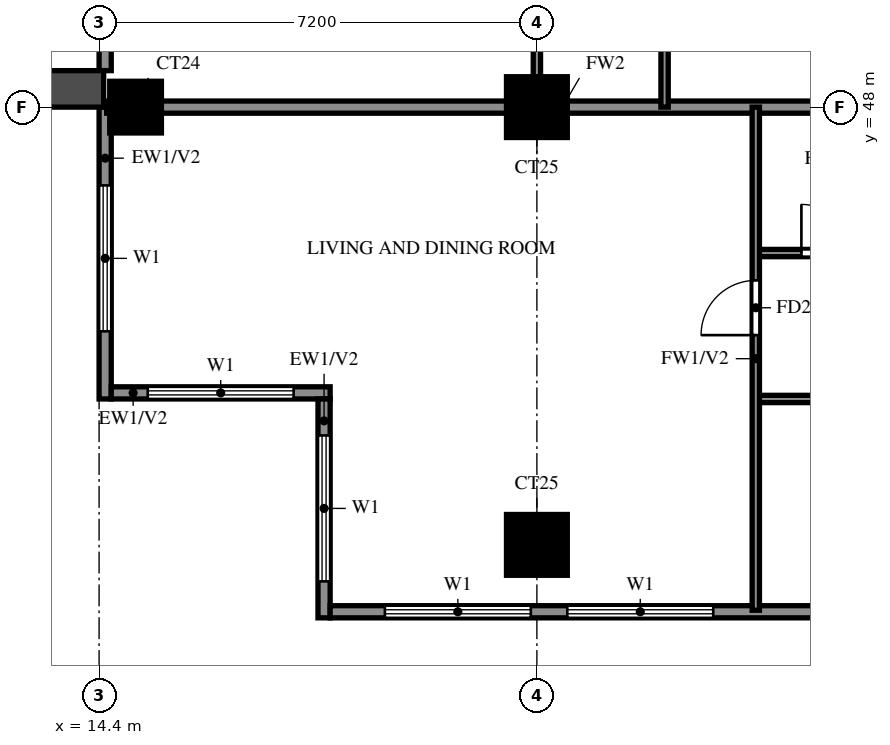
"""IFC4 building model, lengths in metres.
Left out: names, types, materials, properties, quantities, classifications, styles, units other than length and angle.
Written with IfcOpenShell. Run it as: python <this file> out.ifc"""

import sys

from ifc_helpers import new_model, si_unit, direction, frame, frame_2d, origin, origin_2d, place, context, subcontext, project, spatial, rectangle, extrude, source, transform, mapped, element, fill, save


model = new_model("IFC4")
c1 = context("Model", 3, precision=1e-05, world=origin(), true_north=direction((0.0, 1.0)))
c2 = subcontext(c1, "Body", "Model", "MODEL_VIEW")
j1 = project(units=[si_unit("LENGTHUNIT", "METRE"), si_unit("PLANEANGLEUNIT", "RADIAN")], contexts=[c1])
p1 = place(None, origin())
s1 = spatial("IfcSite", under=j1, at=p1, CompositionType="ELEMENT")
p2 = place(p1, origin())
s2 = spatial("IfcBuilding", under=s1, at=p2, CompositionType="ELEMENT")
p3 = place(p2, frame((0.0, 0.0, 153.5)))
s3 = spatial("IfcBuildingStorey", under=s2, at=p3, CompositionType="ELEMENT", Elevation=153.5)
m1 = source(origin(), c2, "Body", "SweptSolid", [
    extrude(rectangle(XDim=1.0, YDim=1.0, at=origin_2d()), origin(), (0.0, 0.0, 1.0), 3.2),
])
p4 = place(p3, frame((21.6, 40.8, 0.0), z_axis=(0.0, 0.0, 1.0), x_axis=(1.0, 0.0, 0.0)))
e1 = element("IfcColumn", 1, at=p4, inside=s3, PredefinedType="COLUMN", context=c2, shape_type="MappedRepresentation", body=[
    mapped(m1, transform((0.0, 0.0, 0.0))),
])
m2 = source(origin(), c2, "Body", "SweptSolid", [
    extrude(rectangle(XDim=0.85, YDim=0.85, at=origin_2d()), origin(), (0.0, 0.0, 1.0), 3.2),
])
p5 = place(p3, frame((15.0, 48.0, 0.0), z_axis=(0.0, 0.0, 1.0), x_axis=(1.0, 0.0, 0.0)))
e2 = element("IfcColumn", 2, at=p5, inside=s3, PredefinedType="COLUMN", context=c2, shape_type="MappedRepresentation", body=[
    mapped(m2, transform((0.0, 0.0, 0.0))),
])
p6 = place(p3, frame((21.6, 48.0, 0.0), z_axis=(0.0, 0.0, 1.0), x_axis=(1.0, 0.0, 0.0)))
e3 = element("IfcColumn", 3, at=p6, inside=s3, PredefinedType="COLUMN", context=c2, shape_type="MappedRepresentation", body=[
    mapped(m1, transform((0.0, 0.0, 0.0))),
])
p7 = place(p3, frame((14.5, 54.6, 0.0), z_axis=(0.0, 0.0, 1.0), x_axis=(0.0, -1.0, 0.0)))
e4 = element("IfcWall", 4, at=p7, inside=s3, PredefinedType="SOLIDWALL", context=c2, shape_type="SweptSolid", body=[
    extrude(rectangle(XDim=6.0, YDim=0.2, at=frame_2d((3.0, 0.0))), origin(), (0.0, 0.0, 1.0), 3.2),
])
p8 = place(p7, frame((2.1, 0.0, 0.0)))
e5 = element("IfcOpeningElement", 5, at=p8, cuts=e4, PredefinedType="OPENING", context=c2, shape_type="SweptSolid", body=[
    extrude(rectangle(XDim=1.8, YDim=2.4, at=frame_2d((0.9, 1.2))), frame((0.0, 0.11, 0.0), z_axis=(0.0, -1.0, 0.0), x_axis=(1.0, 0.0, 0.0)), (0.0, 0.0, 1.0), 0.22),
])
p9 = place(p7, frame((0.4, 0.0, 0.6)))
e6 = element("IfcOpeningElement", 6, at=p9, cuts=e4, PredefinedType="OPENING", context=c2, shape_type="SweptSolid", body=[
    extrude(rectangle(XDim=1.2, YDim=2.4, at=frame_2d((0.6, 1.2))), frame((0.0, 0.11, 0.0), z_axis=(0.0, -1.0, 0.0), x_axis=(1.0, 0.0, 0.0)), (0.0, 0.0, 1.0), 0.22),
])
p10 = place(p7, frame((4.4, 0.0, 0.6)))
e7 = element("IfcOpeningElement", 7, at=p10, cuts=e4, PredefinedType="OPENING", context=c2, shape_type="SweptSolid", body=[
    extrude(rectangle(XDim=1.2, YDim=2.4, at=frame_2d((0.6, 1.2))), frame((0.0, 0.11, 0.0), z_axis=(0.0, -1.0, 0.0), x_axis=(1.0, 0.0, 0.0)), (0.0, 0.0, 1.0), 0.22),
])
p11 = place(p3, frame((14.5, 48.0, 0.0), z_axis=(0.0, 0.0, 1.0), x_axis=(0.0, -1.0, 0.0)))
e8 = element("IfcWall", 8, at=p11, inside=s3, PredefinedType="SOLIDWALL", context=c2, shape_type="SweptSolid", body=[
    extrude(rectangle(XDim=4.8, YDim=0.2, at=frame_2d((2.4, 0.0))), origin(), (0.0, 0.0, 1.0), 3.2),
])
p12 = place(p11, frame((1.288, 0.0, 0.6)))
e9 = element("IfcOpeningElement", 9, at=p12, cuts=e8, PredefinedType="OPENING", context=c2, shape_type="SweptSolid", body=[
    extrude(rectangle(XDim=2.4, YDim=2.4, at=frame_2d((1.2, 1.2))), frame((0.0, 0.11, 0.0), z_axis=(0.0, -1.0, 0.0), x_axis=(1.0, 0.0, 0.0)), (0.0, 0.0, 1.0), 0.22),
])
p13 = place(p3, frame((14.6, 43.3, 0.0), z_axis=(0.0, 0.0, 1.0), x_axis=(1.0, 0.0, 0.0)))
e10 = element("IfcWall", 10, at=p13, inside=s3, PredefinedType="SOLIDWALL", context=c2, shape_type="SweptSolid", body=[
    extrude(rectangle(XDim=3.6, YDim=0.2, at=frame_2d((1.8, 0.0))), origin(), (0.0, 0.0, 1.0), 3.2),
])
p14 = place(p13, frame((0.6, 0.0, 0.6)))
e11 = element("IfcOpeningElement", 11, at=p14, cuts=e10, PredefinedType="OPENING", context=c2, shape_type="SweptSolid", body=[
    extrude(rectangle(XDim=2.4, YDim=2.4, at=frame_2d((1.2, 1.2))), frame((0.0, 0.11, 0.0), z_axis=(0.0, -1.0, 0.0), x_axis=(1.0, 0.0, 0.0)), (0.0, 0.0, 1.0), 0.22),
])
p15 = place(p3, frame((18.1, 43.2, 0.0), z_axis=(0.0, 0.0, 1.0), x_axis=(0.0, -1.0, 0.0)))
e12 = element("IfcWall", 12, at=p15, inside=s3, PredefinedType="SOLIDWALL", context=c2, shape_type="SweptSolid", body=[
    extrude(rectangle(XDim=3.6, YDim=0.2, at=frame_2d((1.8, 0.0))), origin(), (0.0, 0.0, 1.0), 3.2),
])
p16 = place(p15, frame((0.6, 0.0, 0.6)))
e13 = element("IfcOpeningElement", 13, at=p16, cuts=e12, PredefinedType="OPENING", context=c2, shape_type="SweptSolid", body=[
    extrude(rectangle(XDim=2.4, YDim=2.4, at=frame_2d((1.2, 1.2))), frame((0.0, 0.11, 0.0), z_axis=(0.0, -1.0, 0.0), x_axis=(1.0, 0.0, 0.0)), (0.0, 0.0, 1.0), 0.22),
])
p17 = place(p3, frame((18.2, 39.7, 0.0), z_axis=(0.0, 0.0, 1.0), x_axis=(1.0, 0.0, 0.0)))
e14 = element("IfcWall", 14, at=p17, inside=s3, PredefinedType="SOLIDWALL", context=c2, shape_type="SweptSolid", body=[
    extrude(rectangle(XDim=23.8, YDim=0.2, at=frame_2d((11.9, 0.0))), origin(), (0.0, 0.0, 1.0), 3.2),
])
p18 = place(p17, frame((13.3, 0.0, 0.0)))
e15 = element("IfcOpeningElement", 15, at=p18, cuts=e14, PredefinedType="OPENING", context=c2, shape_type="SweptSolid", body=[
    extrude(rectangle(XDim=1.8, YDim=2.4, at=frame_2d((0.9, 1.2))), frame((0.0, 0.11, 0.0), z_axis=(0.0, -1.0, 0.0), x_axis=(1.0, 0.0, 0.0)), (0.0, 0.0, 1.0), 0.22),
])
p19 = place(p17, frame((0.9, 0.0, 0.6)))
e16 = element("IfcOpeningElement", 16, at=p19, cuts=e14, PredefinedType="OPENING", context=c2, shape_type="SweptSolid", body=[
    extrude(rectangle(XDim=2.4, YDim=2.4, at=frame_2d((1.2, 1.2))), frame((0.0, 0.11, 0.0), z_axis=(0.0, -1.0, 0.0), x_axis=(1.0, 0.0, 0.0)), (0.0, 0.0, 1.0), 0.22),
])
p20 = place(p17, frame((3.9, 0.0, 0.6)))
e17 = element("IfcOpeningElement", 17, at=p20, cuts=e14, PredefinedType="OPENING", context=c2, shape_type="SweptSolid", body=[
    extrude(rectangle(XDim=2.4, YDim=2.4, at=frame_2d((1.2, 1.2))), frame((0.0, 0.11, 0.0), z_axis=(0.0, -1.0, 0.0), x_axis=(1.0, 0.0, 0.0)), (0.0, 0.0, 1.0), 0.22),
])
p21 = place(p17, frame((10.9, 0.0, 0.6)))
e18 = element("IfcOpeningElement", 18, at=p21, cuts=e14, PredefinedType="OPENING", context=c2, shape_type="SweptSolid", body=[
    extrude(rectangle(XDim=1.8, YDim=2.4, at=frame_2d((0.9, 1.2))), frame((0.0, 0.11, 0.0), z_axis=(0.0, -1.0, 0.0), x_axis=(1.0, 0.0, 0.0)), (0.0, 0.0, 1.0), 0.22),
])
p22 = place(p17, frame((8.35, 0.0, 1.5)))
e19 = element("IfcOpeningElement", 19, at=p22, cuts=e14, PredefinedType="OPENING", context=c2, shape_type="SweptSolid", body=[
    extrude(rectangle(XDim=0.9, YDim=0.9, at=frame_2d((0.45, 0.45))), frame((0.0, 0.11, 0.0), z_axis=(0.0, -1.0, 0.0), x_axis=(1.0, 0.0, 0.0)), (0.0, 0.0, 1.0), 0.22),
])
p23 = place(p3, frame((14.475, 48.3, 0.0), z_axis=(0.0, 0.0, 1.0), x_axis=(-1.0, 0.0, 0.0)))
e20 = element("IfcWall", 20, at=p23, inside=s3, PredefinedType="SOLIDWALL", context=c2, shape_type="SweptSolid", body=[
    extrude(rectangle(XDim=2.775, YDim=0.6, at=frame_2d((1.388, 0.0))), origin(), (0.0, 0.0, 1.0), 2.85),
])
p24 = place(p3, frame((14.525, 48.0, 0.0), z_axis=(0.0, 0.0, 1.0), x_axis=(1.0, 0.0, 0.0)))
e21 = element("IfcWall", 21, at=p24, inside=s3, PredefinedType="SOLIDWALL", context=c2, shape_type="SweptSolid", body=[
    extrude(rectangle(XDim=14.275, YDim=0.2, at=frame_2d((7.138, 0.0))), origin(), (0.0, 0.0, 1.0), 3.2),
])
p25 = place(p3, frame((25.2, 43.2, 0.0), z_axis=(0.0, 0.0, 1.0), x_axis=(1.0, 0.0, 0.0)))
e22 = element("IfcWall", 22, at=p25, inside=s3, PredefinedType="PARTITIONING", context=c2, shape_type="SweptSolid", body=[
    extrude(rectangle(XDim=3.6, YDim=0.12, at=frame_2d((1.8, 0.0))), origin(), (0.0, 0.0, 1.0), 3.2),
])
p26 = place(p3, frame((25.2, 45.6, 0.0), z_axis=(0.0, 0.0, 1.0), x_axis=(1.0, 0.0, 0.0)))
e23 = element("IfcWall", 23, at=p26, inside=s3, PredefinedType="PARTITIONING", context=c2, shape_type="SweptSolid", body=[
    extrude(rectangle(XDim=6.0, YDim=0.12, at=frame_2d((3.0, 0.0))), origin(), (0.0, 0.0, 1.0), 3.2),
])
p27 = place(p26, frame((0.75, 0.0, 0.0)))
e24 = element("IfcOpeningElement", 24, at=p27, cuts=e23, PredefinedType="OPENING", context=c2, shape_type="SweptSolid", body=[
    extrude(rectangle(XDim=0.8, YDim=2.1, at=frame_2d((0.4, 1.05))), frame((0.0, 0.07, 0.0), z_axis=(0.0, -1.0, 0.0), x_axis=(1.0, 0.0, 0.0)), (0.0, 0.0, 1.0), 0.14),
])
p28 = place(p26, frame((3.7, 0.0, 0.0)))
e25 = element("IfcOpeningElement", 25, at=p28, cuts=e23, PredefinedType="OPENING", context=c2, shape_type="SweptSolid", body=[
    extrude(rectangle(XDim=0.9, YDim=2.1, at=frame_2d((0.45, 1.05))), frame((0.0, 0.07, 0.0), z_axis=(0.0, -1.0, 0.0), x_axis=(1.0, 0.0, 0.0)), (0.0, 0.0, 1.0), 0.14),
])
p29 = place(p3, frame((21.6, 48.0, 0.0), z_axis=(0.0, 0.0, 1.0), x_axis=(0.0, 1.0, 0.0)))
e26 = element("IfcWall", 26, at=p29, inside=s3, PredefinedType="PARTITIONING", context=c2, shape_type="SweptSolid", body=[
    extrude(rectangle(XDim=21.6, YDim=0.12, at=frame_2d((10.8, 0.0))), origin(), (0.0, 0.0, 1.0), 3.2),
])
p30 = place(p29, frame((2.85, 0.0, 0.0)))
e27 = element("IfcOpeningElement", 27, at=p30, cuts=e26, PredefinedType="OPENING", context=c2, shape_type="SweptSolid", body=[
    extrude(rectangle(XDim=1.5, YDim=2.1, at=frame_2d((0.75, 1.05))), frame((0.0, 0.07, 0.0), z_axis=(0.0, -1.0, 0.0), x_axis=(1.0, 0.0, 0.0)), (0.0, 0.0, 1.0), 0.14),
])
p31 = place(p29, frame((8.55, 0.0, 0.0)))
e28 = element("IfcOpeningElement", 28, at=p31, cuts=e26, PredefinedType="OPENING", context=c2, shape_type="SweptSolid", body=[
    extrude(rectangle(XDim=0.9, YDim=2.1, at=frame_2d((0.45, 1.05))), frame((0.0, 0.07, 0.0), z_axis=(0.0, -1.0, 0.0), x_axis=(1.0, 0.0, 0.0)), (0.0, 0.0, 1.0), 0.14),
])
p32 = place(p29, frame((12.15, 0.0, 0.0)))
e29 = element("IfcOpeningElement", 29, at=p32, cuts=e26, PredefinedType="OPENING", context=c2, shape_type="SweptSolid", body=[
    extrude(rectangle(XDim=0.9, YDim=2.1, at=frame_2d((0.45, 1.05))), frame((0.0, 0.07, 0.0), z_axis=(0.0, -1.0, 0.0), x_axis=(1.0, 0.0, 0.0)), (0.0, 0.0, 1.0), 0.14),
])
p33 = place(p29, frame((17.55, 0.0, 0.0)))
e30 = element("IfcOpeningElement", 30, at=p33, cuts=e26, PredefinedType="OPENING", context=c2, shape_type="SweptSolid", body=[
    extrude(rectangle(XDim=0.9, YDim=2.1, at=frame_2d((0.45, 1.05))), frame((0.0, 0.07, 0.0), z_axis=(0.0, -1.0, 0.0), x_axis=(1.0, 0.0, 0.0)), (0.0, 0.0, 1.0), 0.14),
])
p34 = place(p3, frame((23.7, 48.0, 0.0), z_axis=(0.0, 0.0, 1.0), x_axis=(0.0, 1.0, 0.0)))
e31 = element("IfcWall", 31, at=p34, inside=s3, PredefinedType="PARTITIONING", context=c2, shape_type="SweptSolid", body=[
    extrude(rectangle(XDim=2.4, YDim=0.12, at=frame_2d((1.2, 0.0))), origin(), (0.0, 0.0, 1.0), 3.2),
])
p35 = place(p3, frame((25.2, 39.725, 0.0), z_axis=(0.0, 0.0, 1.0), x_axis=(0.0, 1.0, 0.0)))
e32 = element("IfcWall", 32, at=p35, inside=s3, PredefinedType="PARTITIONING", context=c2, shape_type="SweptSolid", body=[
    extrude(rectangle(XDim=8.275, YDim=0.12, at=frame_2d((4.137, 0.0))), origin(), (0.0, 0.0, 1.0), 3.2),
])
p36 = place(p35, frame((4.525, 0.0, 0.0)))
e33 = element("IfcOpeningElement", 33, at=p36, cuts=e32, PredefinedType="OPENING", context=c2, shape_type="SweptSolid", body=[
    extrude(rectangle(XDim=0.9, YDim=2.1, at=frame_2d((0.45, 1.05))), frame((0.0, 0.07, 0.0), z_axis=(0.0, -1.0, 0.0), x_axis=(1.0, 0.0, 0.0)), (0.0, 0.0, 1.0), 0.14),
])
p37 = place(p12, origin())
e34 = element("IfcWindow", 34, at=p37, inside=s3, PartitioningType="DOUBLE_PANEL_VERTICAL", PredefinedType="WINDOW", context=c2, shape_type="SweptSolid", body=[
    extrude(rectangle(XDim=2.4, YDim=2.4, at=frame_2d((1.2, 1.2))), frame((0.0, 0.03, 0.0), z_axis=(0.0, -1.0, 0.0), x_axis=(1.0, 0.0, 0.0)), (0.0, 0.0, 1.0), 0.06),
])
fill(e9, e34)
p38 = place(p14, origin())
e35 = element("IfcWindow", 35, at=p38, inside=s3, PartitioningType="DOUBLE_PANEL_VERTICAL", PredefinedType="WINDOW", context=c2, shape_type="SweptSolid", body=[
    extrude(rectangle(XDim=2.4, YDim=2.4, at=frame_2d((1.2, 1.2))), frame((0.0, 0.03, 0.0), z_axis=(0.0, -1.0, 0.0), x_axis=(1.0, 0.0, 0.0)), (0.0, 0.0, 1.0), 0.06),
])
fill(e11, e35)
p39 = place(p16, origin())
e36 = element("IfcWindow", 36, at=p39, inside=s3, PartitioningType="DOUBLE_PANEL_VERTICAL", PredefinedType="WINDOW", context=c2, shape_type="SweptSolid", body=[
    extrude(rectangle(XDim=2.4, YDim=2.4, at=frame_2d((1.2, 1.2))), frame((0.0, 0.03, 0.0), z_axis=(0.0, -1.0, 0.0), x_axis=(1.0, 0.0, 0.0)), (0.0, 0.0, 1.0), 0.06),
])
fill(e13, e36)
p40 = place(p19, origin())
e37 = element("IfcWindow", 37, at=p40, inside=s3, PartitioningType="DOUBLE_PANEL_VERTICAL", PredefinedType="WINDOW", context=c2, shape_type="SweptSolid", body=[
    extrude(rectangle(XDim=2.4, YDim=2.4, at=frame_2d((1.2, 1.2))), frame((0.0, 0.03, 0.0), z_axis=(0.0, -1.0, 0.0), x_axis=(1.0, 0.0, 0.0)), (0.0, 0.0, 1.0), 0.06),
])
fill(e16, e37)
p41 = place(p20, origin())
e38 = element("IfcWindow", 38, at=p41, inside=s3, PartitioningType="DOUBLE_PANEL_VERTICAL", PredefinedType="WINDOW", context=c2, shape_type="SweptSolid", body=[
    extrude(rectangle(XDim=2.4, YDim=2.4, at=frame_2d((1.2, 1.2))), frame((0.0, 0.03, 0.0), z_axis=(0.0, -1.0, 0.0), x_axis=(1.0, 0.0, 0.0)), (0.0, 0.0, 1.0), 0.06),
])
fill(e17, e38)
p42 = place(p36, origin())
e39 = element("IfcDoor", 39, at=p42, inside=s3, OperationType="SINGLE_SWING_LEFT", PredefinedType="DOOR", context=c2, shape_type="SweptSolid", body=[
    extrude(rectangle(XDim=0.9, YDim=2.1, at=frame_2d((0.45, 1.05))), frame((0.0, 0.025, 0.0), z_axis=(0.0, -1.0, 0.0), x_axis=(1.0, 0.0, 0.0)), (0.0, 0.0, 1.0), 0.05),
])
fill(e33, e39)
p43 = place(p27, origin())
e40 = element("IfcDoor", 40, at=p43, inside=s3, OperationType="SINGLE_SWING_LEFT", PredefinedType="DOOR", context=c2, shape_type="SweptSolid", body=[
    extrude(rectangle(XDim=0.8, YDim=2.1, at=frame_2d((0.4, 1.05))), frame((0.0, 0.025, 0.0), z_axis=(0.0, -1.0, 0.0), x_axis=(1.0, 0.0, 0.0)), (0.0, 0.0, 1.0), 0.05),
])
fill(e24, e40)
save(model, sys.argv[1])
